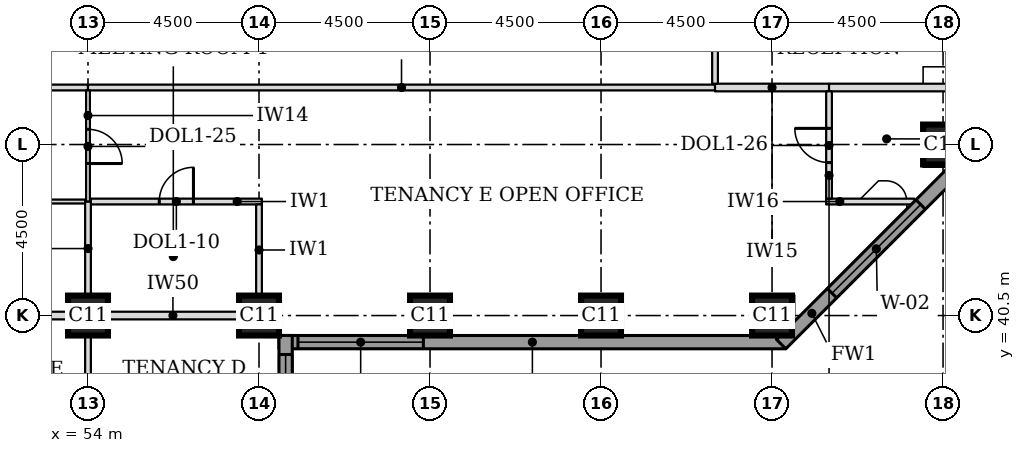
"""IFC4 building model, lengths in metres.
Left out: names, types, materials, properties, quantities, classifications, styles, units other than length and angle.
Written with IfcOpenShell. Run it as: python <this file> out.ifc"""

import sys

from ifc_helpers import new_model, si_unit, direction, frame, frame_2d, origin, origin_2d, place, context, subcontext, project, spatial, rectangle, extrude, element, fill, save


model = new_model("IFC4")
c1 = context("Model", 3, precision=1e-05, world=origin(), true_north=direction((0.0, 1.0)))
c2 = subcontext(c1, "Body", "Model", "MODEL_VIEW")
j1 = project(units=[si_unit("LENGTHUNIT", "METRE"), si_unit("PLANEANGLEUNIT", "RADIAN")], contexts=[c1])
p1 = place(None, origin())
s1 = spatial("IfcSite", under=j1, at=p1, CompositionType="ELEMENT")
p2 = place(p1, origin())
s2 = spatial("IfcBuilding", under=s1, at=p2, CompositionType="ELEMENT")
p3 = place(p2, frame((0.0, 0.0, 82.6)))
s3 = spatial("IfcBuildingStorey", under=s2, at=p3, CompositionType="ELEMENT", Elevation=82.6)
for number, where, z_axis, x_axis in (
    (1, (54.0, 40.5, 0.0), (0.0, 0.0, 1.0), (1.0, 0.0, 0.0)),
    (2, (58.5, 40.5, 0.0), (0.0, 0.0, 1.0), (1.0, 0.0, 0.0)),
    (3, (63.0, 40.5, 0.0), (0.0, 0.0, 1.0), (1.0, 0.0, 0.0)),
    (4, (67.5, 40.5, 0.0), (0.0, 0.0, 1.0), (1.0, 0.0, 0.0)),
    (5, (72.0, 40.5, 0.0), (0.0, 0.0, 1.0), (1.0, 0.0, 0.0)),
    (6, (76.5, 45.0, 0.0), (0.0, 0.0, 1.0), (1.0, 0.0, 0.0)),
):
    element("IfcColumn", number, at=place(p3, frame(where, z_axis=z_axis, x_axis=x_axis)), inside=s3, PredefinedType="COLUMN", context=c2, shape_type="SweptSolid", body=[
        extrude(rectangle(XDim=1.05, YDim=1.05, at=origin_2d()), origin(), (0.0, 0.0, 1.0), 3.7),
    ])
p4 = place(p3, frame((59.025, 39.8, 0.0), z_axis=(0.0, 0.0, 1.0), x_axis=(1.0, 0.0, 0.0)))
e7 = element("IfcWall", 7, at=p4, inside=s3, PredefinedType="STANDARD", context=c2, shape_type="SweptSolid", body=[
    extrude(rectangle(XDim=13.337, YDim=0.35, at=frame_2d((6.669, 0.0))), origin(), (0.0, 0.0, 1.0), 3.525),
])
p5 = place(p4, frame((0.5, 0.0, 0.9)))
e8 = element("IfcOpeningElement", 8, at=p5, cuts=e7, PredefinedType="OPENING", context=c2, shape_type="SweptSolid", body=[
    extrude(rectangle(XDim=3.3, YDim=1.9, at=frame_2d((1.65, 0.95))), frame((0.0, 0.185, 0.0), z_axis=(0.0, -1.0, 0.0), x_axis=(1.0, 0.0, 0.0)), (0.0, 0.0, 1.0), 0.37),
])
p6 = place(p3, frame((72.239, 39.749, 0.0), z_axis=(0.0, 0.0, 1.0), x_axis=(0.707106781187, 0.707106781187, 0.0)))
e9 = element("IfcWall", 9, at=p6, inside=s3, PredefinedType="STANDARD", context=c2, shape_type="SweptSolid", body=[
    extrude(rectangle(XDim=7.089, YDim=0.35, at=frame_2d((3.544, 0.0))), origin(), (0.0, 0.0, 1.0), 3.525),
])
p7 = place(p6, frame((1.894, 0.0, 0.9)))
e10 = element("IfcOpeningElement", 10, at=p7, cuts=e9, PredefinedType="OPENING", context=c2, shape_type="SweptSolid", body=[
    extrude(rectangle(XDim=3.3, YDim=1.9, at=frame_2d((1.65, 0.95))), frame((0.0, 0.185, 0.0), z_axis=(0.0, -1.0, 0.0), x_axis=(1.0, 0.0, 0.0)), (0.0, 0.0, 1.0), 0.37),
])
p8 = place(p3, frame((59.2, 22.138, 0.0), z_axis=(0.0, 0.0, 1.0), x_axis=(0.0, 1.0, 0.0)))
e11 = element("IfcWall", 11, at=p8, inside=s3, PredefinedType="STANDARD", context=c2, shape_type="SweptSolid", body=[
    extrude(rectangle(XDim=17.837, YDim=0.35, at=frame_2d((8.919, 0.0))), origin(), (0.0, 0.0, 1.0), 3.525),
])
p9 = place(p8, frame((5.462, 0.0, 0.9)))
e12 = element("IfcOpeningElement", 12, at=p9, cuts=e11, PredefinedType="OPENING", context=c2, shape_type="SweptSolid", body=[
    extrude(rectangle(XDim=3.3, YDim=1.9, at=frame_2d((1.65, 0.95))), frame((0.0, 0.185, 0.0), z_axis=(0.0, -1.0, 0.0), x_axis=(1.0, 0.0, 0.0)), (0.0, 0.0, 1.0), 0.37),
])
p10 = place(p8, frame((14.037, 0.0, 0.9)))
e13 = element("IfcOpeningElement", 13, at=p10, cuts=e11, PredefinedType="OPENING", context=c2, shape_type="SweptSolid", body=[
    extrude(rectangle(XDim=3.3, YDim=1.9, at=frame_2d((1.65, 0.95))), frame((0.0, 0.185, 0.0), z_axis=(0.0, -1.0, 0.0), x_axis=(1.0, 0.0, 0.0)), (0.0, 0.0, 1.0), 0.37),
])
p11 = place(p3, frame((50.015, 40.5, 0.0), z_axis=(0.0, 0.0, 1.0), x_axis=(1.0, 0.0, 0.0)))
e14 = element("IfcWall", 14, at=p11, inside=s3, PredefinedType="PARTITIONING", context=c2, shape_type="SweptSolid", body=[
    extrude(rectangle(XDim=3.46, YDim=0.2, at=frame_2d((1.73, 0.0))), origin(), (0.0, 0.0, 1.0), 2.8),
])
p12 = place(p3, frame((54.495, 40.5, 0.0), z_axis=(0.0, 0.0, 1.0), x_axis=(1.0, 0.0, 0.0)))
e15 = element("IfcWall", 15, at=p12, inside=s3, PredefinedType="PARTITIONING", context=c2, shape_type="SweptSolid", body=[
    extrude(rectangle(XDim=3.48, YDim=0.2, at=frame_2d((1.74, 0.0))), origin(), (0.0, 0.0, 1.0), 2.8),
])
p13 = place(p3, frame((49.575, 43.5, 0.0), z_axis=(0.0, 0.0, 1.0), x_axis=(1.0, 0.0, 0.0)))
e16 = element("IfcWall", 16, at=p13, inside=s3, PredefinedType="PARTITIONING", context=c2, shape_type="SweptSolid", body=[
    extrude(rectangle(XDim=4.35, YDim=0.1, at=frame_2d((2.175, 0.0))), origin(), (0.0, 0.0, 1.0), 3.55),
])
p14 = place(p13, frame((1.7, 0.0, 0.0)))
e17 = element("IfcOpeningElement", 17, at=p14, cuts=e16, PredefinedType="OPENING", context=c2, shape_type="SweptSolid", body=[
    extrude(rectangle(XDim=0.9, YDim=2.1, at=frame_2d((0.45, 1.05))), frame((0.0, 0.06, 0.0), z_axis=(0.0, -1.0, 0.0), x_axis=(1.0, 0.0, 0.0)), (0.0, 0.0, 1.0), 0.12),
])
p15 = place(p3, frame((54.075, 43.5, 0.0), z_axis=(0.0, 0.0, 1.0), x_axis=(1.0, 0.0, 0.0)))
e18 = element("IfcWall", 18, at=p15, inside=s3, PredefinedType="PARTITIONING", context=c2, shape_type="SweptSolid", body=[
    extrude(rectangle(XDim=4.5, YDim=0.15, at=frame_2d((2.25, 0.0))), origin(), (0.0, 0.0, 1.0), 3.55),
])
p16 = place(p15, frame((1.8, 0.0, 0.0)))
e19 = element("IfcOpeningElement", 19, at=p16, cuts=e18, PredefinedType="OPENING", context=c2, shape_type="SweptSolid", body=[
    extrude(rectangle(XDim=0.9, YDim=2.1, at=frame_2d((0.45, 1.05))), frame((0.0, 0.085, 0.0), z_axis=(0.0, -1.0, 0.0), x_axis=(1.0, 0.0, 0.0)), (0.0, 0.0, 1.0), 0.17),
])
p17 = place(p3, frame((73.425, 43.5, 0.0), z_axis=(0.0, 0.0, 1.0), x_axis=(1.0, 0.0, 0.0)))
e20 = element("IfcWall", 20, at=p17, inside=s3, PredefinedType="PARTITIONING", context=c2, shape_type="SweptSolid", body=[
    extrude(rectangle(XDim=2.317, YDim=0.15, at=frame_2d((1.159, 0.0))), origin(), (0.0, 0.0, 1.0), 3.55),
])
p18 = place(p3, frame((49.425, 46.5, 0.0), z_axis=(0.0, 0.0, 1.0), x_axis=(1.0, 0.0, 0.0)))
e21 = element("IfcWall", 21, at=p18, inside=s3, PredefinedType="PARTITIONING", context=c2, shape_type="SweptSolid", body=[
    extrude(rectangle(XDim=4.575, YDim=0.15, at=frame_2d((2.288, 0.0))), origin(), (0.0, 0.0, 1.0), 3.55),
])
p19 = place(p18, frame((1.8, 0.0, 0.0)))
e22 = element("IfcOpeningElement", 22, at=p19, cuts=e21, PredefinedType="OPENING", context=c2, shape_type="SweptSolid", body=[
    extrude(rectangle(XDim=1.0, YDim=2.1, at=frame_2d((0.5, 1.05))), frame((0.0, 0.085, 0.0), z_axis=(0.0, -1.0, 0.0), x_axis=(1.0, 0.0, 0.0)), (0.0, 0.0, 1.0), 0.17),
])
p20 = place(p3, frame((54.0, 46.5, 0.0), z_axis=(0.0, 0.0, 1.0), x_axis=(1.0, 0.0, 0.0)))
e23 = element("IfcWall", 23, at=p20, inside=s3, PredefinedType="PARTITIONING", context=c2, shape_type="SweptSolid", body=[
    extrude(rectangle(XDim=16.5, YDim=0.15, at=frame_2d((8.25, 0.0))), origin(), (0.0, 0.0, 1.0), 3.55),
])
p21 = place(p3, frame((70.5, 46.5, 0.0), z_axis=(0.0, 0.0, 1.0), x_axis=(1.0, 0.0, 0.0)))
e24 = element("IfcWall", 24, at=p21, inside=s3, PredefinedType="PARTITIONING", context=c2, shape_type="SweptSolid", body=[
    extrude(rectangle(XDim=3.0, YDim=0.2, at=frame_2d((1.5, 0.0))), origin(), (0.0, 0.0, 1.0), 3.55),
])
p22 = place(p3, frame((73.5, 46.5, 0.0), z_axis=(0.0, 0.0, 1.0), x_axis=(1.0, 0.0, 0.0)))
e25 = element("IfcWall", 25, at=p22, inside=s3, PredefinedType="PARTITIONING", context=c2, shape_type="SweptSolid", body=[
    extrude(rectangle(XDim=3.525, YDim=0.2, at=frame_2d((1.762, 0.0))), origin(), (0.0, 0.0, 1.0), 3.55),
])
p23 = place(p3, frame((54.0, 36.075, 0.0), z_axis=(0.0, 0.0, 1.0), x_axis=(0.0, 1.0, 0.0)))
e26 = element("IfcWall", 26, at=p23, inside=s3, PredefinedType="PARTITIONING", context=c2, shape_type="SweptSolid", body=[
    extrude(rectangle(XDim=3.9, YDim=0.15, at=frame_2d((1.95, 0.0))), origin(), (0.0, 0.0, 1.0), 3.55),
])
p24 = place(p3, frame((54.0, 41.025, 0.0), z_axis=(0.0, 0.0, 1.0), x_axis=(0.0, 1.0, 0.0)))
e27 = element("IfcWall", 27, at=p24, inside=s3, PredefinedType="PARTITIONING", context=c2, shape_type="SweptSolid", body=[
    extrude(rectangle(XDim=2.475, YDim=0.15, at=frame_2d((1.238, 0.0))), origin(), (0.0, 0.0, 1.0), 3.55),
])
p25 = place(p3, frame((58.5, 41.025, 0.0), z_axis=(0.0, 0.0, 1.0), x_axis=(0.0, 1.0, 0.0)))
e28 = element("IfcWall", 28, at=p25, inside=s3, PredefinedType="PARTITIONING", context=c2, shape_type="SweptSolid", body=[
    extrude(rectangle(XDim=2.4, YDim=0.15, at=frame_2d((1.2, 0.0))), origin(), (0.0, 0.0, 1.0), 3.55),
])
p26 = place(p3, frame((54.0, 43.5, 0.0), z_axis=(0.0, 0.0, 1.0), x_axis=(0.0, 1.0, 0.0)))
e29 = element("IfcWall", 29, at=p26, inside=s3, PredefinedType="PARTITIONING", context=c2, shape_type="SweptSolid", body=[
    extrude(rectangle(XDim=2.925, YDim=0.1, at=frame_2d((1.462, 0.0))), origin(), (0.0, 0.0, 1.0), 3.55),
])
p27 = place(p26, frame((1.0, 0.0, 0.0)))
e30 = element("IfcOpeningElement", 30, at=p27, cuts=e29, PredefinedType="OPENING", context=c2, shape_type="SweptSolid", body=[
    extrude(rectangle(XDim=0.9, YDim=2.1, at=frame_2d((0.45, 1.05))), frame((0.0, 0.06, 0.0), z_axis=(0.0, -1.0, 0.0), x_axis=(1.0, 0.0, 0.0)), (0.0, 0.0, 1.0), 0.12),
])
p28 = place(p3, frame((73.5, 43.575, 0.0), z_axis=(0.0, 0.0, 1.0), x_axis=(0.0, 1.0, 0.0)))
e31 = element("IfcWall", 31, at=p28, inside=s3, PredefinedType="PARTITIONING", context=c2, shape_type="SweptSolid", body=[
    extrude(rectangle(XDim=2.825, YDim=0.15, at=frame_2d((1.413, 0.0))), origin(), (0.0, 0.0, 1.0), 3.55),
])
p29 = place(p28, frame((0.95, 0.0, 0.0)))
e32 = element("IfcOpeningElement", 32, at=p29, cuts=e31, PredefinedType="OPENING", context=c2, shape_type="SweptSolid", body=[
    extrude(rectangle(XDim=0.9, YDim=2.1, at=frame_2d((0.45, 1.05))), frame((0.0, 0.085, 0.0), z_axis=(0.0, -1.0, 0.0), x_axis=(1.0, 0.0, 0.0)), (0.0, 0.0, 1.0), 0.17),
])
p30 = place(p3, frame((70.5, 46.6, 0.0), z_axis=(0.0, 0.0, 1.0), x_axis=(0.0, 1.0, 0.0)))
e33 = element("IfcWall", 33, at=p30, inside=s3, PredefinedType="PARTITIONING", context=c2, shape_type="SweptSolid", body=[
    extrude(rectangle(XDim=4.4, YDim=0.15, at=frame_2d((2.2, 0.0))), origin(), (0.0, 0.0, 1.0), 3.55),
])
p31 = place(p30, frame((1.7, 0.0, 0.0)))
e34 = element("IfcOpeningElement", 34, at=p31, cuts=e33, PredefinedType="OPENING", context=c2, shape_type="SweptSolid", body=[
    extrude(rectangle(XDim=1.0, YDim=2.1, at=frame_2d((0.5, 1.05))), frame((0.0, 0.085, 0.0), z_axis=(0.0, -1.0, 0.0), x_axis=(1.0, 0.0, 0.0)), (0.0, 0.0, 1.0), 0.17),
])
p32 = place(p5, origin())
e35 = element("IfcWindow", 35, at=p32, inside=s3, PartitioningType="SINGLE_PANEL", PredefinedType="WINDOW", context=c2, shape_type="SweptSolid", body=[
    extrude(rectangle(XDim=3.3, YDim=1.9, at=frame_2d((1.65, 0.95))), frame((0.0, 0.085, 0.0), z_axis=(0.0, -1.0, 0.0), x_axis=(1.0, 0.0, 0.0)), (0.0, 0.0, 1.0), 0.06),
])
fill(e8, e35)
p33 = place(p7, origin())
e36 = element("IfcWindow", 36, at=p33, inside=s3, PartitioningType="SINGLE_PANEL", PredefinedType="WINDOW", context=c2, shape_type="SweptSolid", body=[
    extrude(rectangle(XDim=3.3, YDim=1.9, at=frame_2d((1.65, 0.95))), frame((0.0, 0.085, 0.0), z_axis=(0.0, -1.0, 0.0), x_axis=(1.0, 0.0, 0.0)), (0.0, 0.0, 1.0), 0.06),
])
fill(e10, e36)
p34 = place(p10, origin())
e37 = element("IfcWindow", 37, at=p34, inside=s3, PartitioningType="SINGLE_PANEL", PredefinedType="WINDOW", context=c2, shape_type="SweptSolid", body=[
    extrude(rectangle(XDim=3.3, YDim=1.9, at=frame_2d((1.65, 0.95))), frame((0.0, 0.085, 0.0), z_axis=(0.0, -1.0, 0.0), x_axis=(1.0, 0.0, 0.0)), (0.0, 0.0, 1.0), 0.06),
])
fill(e13, e37)
p35 = place(p27, frame((0.9, 0.0, 0.0), z_axis=(0.0, 0.0, 1.0), x_axis=(-1.0, 0.0, 0.0)))
e38 = element("IfcDoor", 38, at=p35, inside=s3, OperationType="SINGLE_SWING_RIGHT", PredefinedType="DOOR", context=c2, shape_type="SweptSolid", body=[
    extrude(rectangle(XDim=0.9, YDim=2.1, at=frame_2d((0.45, 1.05))), frame((0.0, 0.025, 0.0), z_axis=(0.0, -1.0, 0.0), x_axis=(1.0, 0.0, 0.0)), (0.0, 0.0, 1.0), 0.05),
])
fill(e30, e38)
p36 = place(p29, origin())
e39 = element("IfcDoor", 39, at=p36, inside=s3, OperationType="SINGLE_SWING_RIGHT", PredefinedType="DOOR", context=c2, shape_type="SweptSolid", body=[
    extrude(rectangle(XDim=0.9, YDim=2.1, at=frame_2d((0.45, 1.05))), frame((0.0, 0.025, 0.0), z_axis=(0.0, -1.0, 0.0), x_axis=(1.0, 0.0, 0.0)), (0.0, 0.0, 1.0), 0.05),
])
fill(e32, e39)
p37 = place(p16, origin())
e40 = element("IfcDoor", 40, at=p37, inside=s3, OperationType="SINGLE_SWING_RIGHT", PredefinedType="DOOR", context=c2, shape_type="SweptSolid", body=[
    extrude(rectangle(XDim=0.9, YDim=2.1, at=frame_2d((0.45, 1.05))), frame((0.0, 0.025, 0.0), z_axis=(0.0, -1.0, 0.0), x_axis=(1.0, 0.0, 0.0)), (0.0, 0.0, 1.0), 0.05),
])
fill(e19, e40)
save(model, sys.argv[1])
